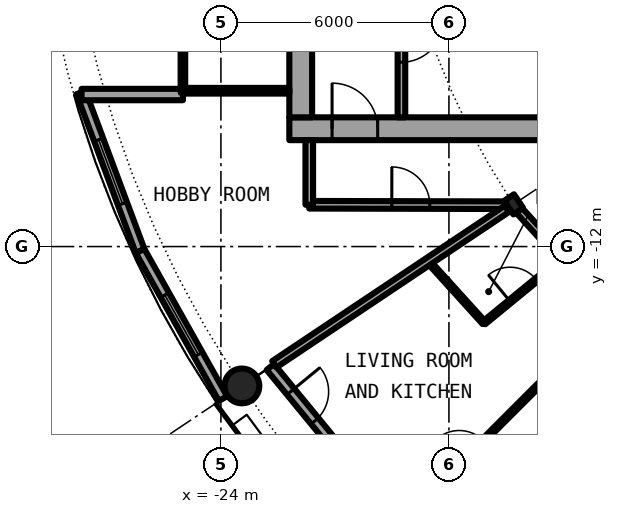
"""IFC4 building model, lengths in metres.
Left out: names, types, materials, properties, quantities, classifications, styles, units other than length and angle.
Written with IfcOpenShell. Run it as: python <this file> out.ifc"""

import sys

from ifc_helpers import new_model, si_unit, direction, frame, frame_2d, origin, origin_2d, place, context, subcontext, project, spatial, rectangle, hollow_circle, i_section, extrude, element, fill, save


model = new_model("IFC4")
c1 = context("Model", 3, precision=1e-05, world=origin(), true_north=direction((0.0, 1.0)))
c2 = subcontext(c1, "Body", "Model", "MODEL_VIEW")
j1 = project(units=[si_unit("LENGTHUNIT", "METRE"), si_unit("PLANEANGLEUNIT", "RADIAN")], contexts=[c1])
p1 = place(None, origin())
s1 = spatial("IfcSite", under=j1, at=p1, CompositionType="ELEMENT")
p2 = place(p1, origin())
s2 = spatial("IfcBuilding", under=s1, at=p2, CompositionType="ELEMENT")
p3 = place(p2, frame((0.0, 0.0, 120.8)))
s3 = spatial("IfcBuildingStorey", under=s2, at=p3, CompositionType="ELEMENT", Elevation=120.8)
p4 = place(p3, frame((-23.448, -15.667, 0.0), z_axis=(0.0, 0.0, 1.0), x_axis=(1.0, 0.0, 0.0)))
e1 = element("IfcColumn", 1, at=p4, inside=s3, PredefinedType="COLUMN", context=c2, shape_type="SweptSolid", body=[
    extrude(hollow_circle(Radius=0.457, WallThickness=0.04, at=origin_2d()), origin(), (0.0, 0.0, 1.0), 3.05),
])
p5 = place(p3, frame((-16.297, -10.889, 0.0), z_axis=(0.0, 0.0, 1.0), x_axis=(-0.831469612303, -0.55557023302, 0.0)))
e2 = element("IfcColumn", 2, at=p5, inside=s3, PredefinedType="COLUMN", context=c2, shape_type="SweptSolid", body=[
    extrude(i_section(OverallWidth=0.307, OverallDepth=0.432, WebThickness=0.021, FlangeThickness=0.04, FilletRadius=0.027, at=origin_2d()), origin(), (0.0, 0.0, 1.0), 3.05),
])
p6 = place(p3, frame((-22.699, -15.167, 0.0), z_axis=(0.0, 0.0, 1.0), x_axis=(0.634382322723, -0.773019449054, 0.0)))
e3 = element("IfcWall", 3, at=p6, inside=s3, PredefinedType="SOLIDWALL", context=c2, shape_type="SweptSolid", body=[
    extrude(rectangle(XDim=5.352, YDim=0.25, at=frame_2d((2.676, 0.0))), origin(), (0.0, 0.0, 1.0), 2.7),
])
p7 = place(p6, frame((0.841, 0.0, 0.0)))
e4 = element("IfcOpeningElement", 4, at=p7, cuts=e3, PredefinedType="OPENING", context=c2, shape_type="SweptSolid", body=[
    extrude(rectangle(XDim=1.0, YDim=2.2, at=frame_2d((0.5, 1.1))), frame((0.0, 0.135, 0.0), z_axis=(0.0, -1.0, 0.0), x_axis=(1.0, 0.0, 0.0)), (0.0, 0.0, 1.0), 0.27),
])
p8 = place(p6, frame((3.111, 0.0, 0.3)))
e5 = element("IfcOpeningElement", 5, at=p8, cuts=e3, PredefinedType="OPENING", context=c2, shape_type="SweptSolid", body=[
    extrude(rectangle(XDim=1.8, YDim=2.1, at=frame_2d((0.9, 1.05))), frame((0.0, 0.135, 0.0), z_axis=(0.0, -1.0, 0.0), x_axis=(1.0, 0.0, 0.0)), (0.0, 0.0, 1.0), 0.27),
])
p9 = place(p3, frame((-27.682, -7.945, 0.0), z_axis=(0.0, 0.0, 1.0), x_axis=(0.349247811493, -0.937030397675, 0.0)))
e6 = element("IfcWall", 6, at=p9, inside=s3, PredefinedType="SOLIDWALL", context=c2, shape_type="SweptSolid", body=[
    extrude(rectangle(XDim=4.452, YDim=0.25, at=frame_2d((2.226, 0.0))), origin(), (0.0, 0.0, 1.0), 2.7),
])
p10 = place(p9, frame((1.327, 0.0, 0.3)))
e7 = element("IfcOpeningElement", 7, at=p10, cuts=e6, PredefinedType="OPENING", context=c2, shape_type="SweptSolid", body=[
    extrude(rectangle(XDim=1.8, YDim=2.1, at=frame_2d((0.9, 1.05))), frame((0.0, 0.135, 0.0), z_axis=(0.0, -1.0, 0.0), x_axis=(1.0, 0.0, 0.0)), (0.0, 0.0, 1.0), 0.27),
])
p11 = place(p3, frame((-26.127, -12.117, 0.0), z_axis=(0.0, 0.0, 1.0), x_axis=(0.489696356642, -0.871893042919, 0.0)))
e8 = element("IfcWall", 8, at=p11, inside=s3, PredefinedType="SOLIDWALL", context=c2, shape_type="SweptSolid", body=[
    extrude(rectangle(XDim=4.454, YDim=0.25, at=frame_2d((2.227, 0.0))), origin(), (0.0, 0.0, 1.0), 2.7),
])
p12 = place(p11, frame((1.327, 0.0, 0.3)))
e9 = element("IfcOpeningElement", 9, at=p12, cuts=e8, PredefinedType="OPENING", context=c2, shape_type="SweptSolid", body=[
    extrude(rectangle(XDim=1.8, YDim=2.1, at=frame_2d((0.9, 1.05))), frame((0.0, 0.135, 0.0), z_axis=(0.0, -1.0, 0.0), x_axis=(1.0, 0.0, 0.0)), (0.0, 0.0, 1.0), 0.27),
])
p13 = place(p3, frame((-25.0, -8.0, 0.0), z_axis=(0.0, 0.0, 1.0), x_axis=(-1.0, 0.0, 0.0)))
e10 = element("IfcWall", 10, at=p13, inside=s3, PredefinedType="SOLIDWALL", context=c2, shape_type="SweptSolid", body=[
    extrude(rectangle(XDim=2.667, YDim=0.3, at=frame_2d((1.333, 0.0))), origin(), (0.0, 0.0, 1.0), 2.7),
])
p14 = place(p3, frame((-22.2, -8.9, 0.0), z_axis=(0.0, 0.0, 1.0), x_axis=(1.0, 0.0, 0.0)))
e11 = element("IfcWall", 11, at=p14, inside=s3, PredefinedType="SHEAR", context=c2, shape_type="SweptSolid", body=[
    extrude(rectangle(XDim=13.8, YDim=0.6, at=frame_2d((6.9, 0.0))), origin(), (0.0, 0.0, 1.0), 3.05),
])
p15 = place(p14, frame((1.125, 0.0, 0.0)))
e12 = element("IfcOpeningElement", 12, at=p15, cuts=e11, PredefinedType="OPENING", context=c2, shape_type="SweptSolid", body=[
    extrude(rectangle(XDim=1.2, YDim=2.3, at=frame_2d((0.6, 1.15))), frame((0.0, 0.31, 0.0), z_axis=(0.0, -1.0, 0.0), x_axis=(1.0, 0.0, 0.0)), (0.0, 0.0, 1.0), 0.62),
])
p16 = place(p3, frame((-21.9, -8.6, 0.0), z_axis=(0.0, 0.0, 1.0), x_axis=(0.0, 1.0, 0.0)))
e13 = element("IfcWall", 13, at=p16, inside=s3, PredefinedType="SHEAR", context=c2, shape_type="SweptSolid", body=[
    extrude(rectangle(XDim=17.2, YDim=0.6, at=frame_2d((8.6, 0.0))), origin(), (0.0, 0.0, 1.0), 3.05),
])
p17 = place(p16, frame((7.7, 0.0, 0.0)))
e14 = element("IfcOpeningElement", 14, at=p17, cuts=e13, PredefinedType="OPENING", context=c2, shape_type="SweptSolid", body=[
    extrude(rectangle(XDim=1.8, YDim=2.3, at=frame_2d((0.9, 1.15))), frame((0.0, 0.31, 0.0), z_axis=(0.0, -1.0, 0.0), x_axis=(1.0, 0.0, 0.0)), (0.0, 0.0, 1.0), 0.62),
])
p18 = place(p3, frame((-19.25, -1.575, 0.0), z_axis=(0.0, 0.0, 1.0), x_axis=(0.0, -1.0, 0.0)))
e15 = element("IfcWall", 15, at=p18, inside=s3, PredefinedType="SOLIDWALL", context=c2, shape_type="SweptSolid", body=[
    extrude(rectangle(XDim=7.025, YDim=0.2, at=frame_2d((3.513, 0.0))), origin(), (0.0, 0.0, 1.0), 2.7),
])
p19 = place(p18, frame((4.475, 0.0, 0.0)))
e16 = element("IfcOpeningElement", 16, at=p19, cuts=e15, PredefinedType="OPENING", context=c2, shape_type="SweptSolid", body=[
    extrude(rectangle(XDim=1.1, YDim=2.3, at=frame_2d((0.55, 1.15))), frame((0.0, 0.11, 0.0), z_axis=(0.0, -1.0, 0.0), x_axis=(1.0, 0.0, 0.0)), (0.0, 0.0, 1.0), 0.22),
])
p20 = place(p3, frame((-22.2, -7.9, 0.0), z_axis=(0.0, 0.0, 1.0), x_axis=(-1.0, 0.0, 0.0)))
e17 = element("IfcWall", 17, at=p20, inside=s3, PredefinedType="PARTITIONING", context=c2, shape_type="SweptSolid", body=[
    extrude(rectangle(XDim=2.74, YDim=0.15, at=frame_2d((1.37, 0.0))), origin(), (0.0, 0.0, 1.0), 2.7),
])
p21 = place(p3, frame((-25.0, 7.95, 0.0), z_axis=(0.0, 0.0, 1.0), x_axis=(0.0, -1.0, 0.0)))
e18 = element("IfcWall", 18, at=p21, inside=s3, PredefinedType="PARTITIONING", context=c2, shape_type="SweptSolid", body=[
    extrude(rectangle(XDim=15.9, YDim=0.12, at=frame_2d((7.95, 0.0))), origin(), (0.0, 0.0, 1.0), 2.7),
])
p22 = place(p21, frame((0.95, 0.0, 0.1)))
e19 = element("IfcOpeningElement", 19, at=p22, cuts=e18, PredefinedType="OPENING", context=c2, shape_type="SweptSolid", body=[
    extrude(rectangle(XDim=14.0, YDim=2.35, at=frame_2d((7.0, 1.175))), frame((0.0, 0.07, 0.0), z_axis=(0.0, -1.0, 0.0), x_axis=(1.0, 0.0, 0.0)), (0.0, 0.0, 1.0), 0.14),
])
p23 = place(p3, frame((-18.542, -12.389, 0.0), z_axis=(0.0, 0.0, 1.0), x_axis=(0.671396556615, -0.741098282123, 0.0)))
e20 = element("IfcWall", 20, at=p23, inside=s3, PredefinedType="PARTITIONING", context=c2, shape_type="SweptSolid", body=[
    extrude(rectangle(XDim=2.182, YDim=0.1, at=frame_2d((1.091, 0.0))), origin(), (0.0, 0.0, 1.0), 2.7),
])
p24 = place(p3, frame((-16.192, -11.004, 0.0), z_axis=(0.0, 0.0, 1.0), x_axis=(0.671481997275, -0.741020868354, 0.0)))
e21 = element("IfcWall", 21, at=p24, inside=s3, PredefinedType="PARTITIONING", context=c2, shape_type="SweptSolid", body=[
    extrude(rectangle(XDim=5.596, YDim=0.2, at=frame_2d((2.798, 0.0))), origin(), (0.0, 0.0, 1.0), 2.39),
])
p25 = place(p24, frame((3.179, 0.0, 0.0)))
e22 = element("IfcOpeningElement", 22, at=p25, cuts=e21, PredefinedType="OPENING", context=c2, shape_type="SweptSolid", body=[
    extrude(rectangle(XDim=1.0, YDim=2.3, at=frame_2d((0.5, 1.15))), frame((0.0, 0.11, 0.0), z_axis=(0.0, -1.0, 0.0), x_axis=(1.0, 0.0, 0.0)), (0.0, 0.0, 1.0), 0.22),
])
p26 = place(p3, frame((-21.675, -10.9, 0.0), z_axis=(0.0, 0.0, 1.0), x_axis=(0.999997173357, -0.002377662213, 0.0)))
e23 = element("IfcWall", 23, at=p26, inside=s3, PredefinedType="PARTITIONING", context=c2, shape_type="SweptSolid", body=[
    extrude(rectangle(XDim=5.134, YDim=0.2, at=frame_2d((2.567, 0.0))), origin(), (0.0, 0.0, 1.0), 2.7),
])
p27 = place(p26, frame((2.171, 0.0, 0.0)))
e24 = element("IfcOpeningElement", 24, at=p27, cuts=e23, PredefinedType="OPENING", context=c2, shape_type="SweptSolid", body=[
    extrude(rectangle(XDim=1.0, YDim=2.3, at=frame_2d((0.5, 1.15))), frame((0.0, 0.11, 0.0), z_axis=(0.0, -1.0, 0.0), x_axis=(1.0, 0.0, 0.0)), (0.0, 0.0, 1.0), 0.22),
])
p28 = place(p3, frame((-22.595, -15.097, 0.0), z_axis=(0.0, 0.0, 1.0), x_axis=(0.831467903109, 0.555572791, 0.0)))
e25 = element("IfcWall", 25, at=p28, inside=s3, PredefinedType="PARTITIONING", context=c2, shape_type="SweptSolid", body=[
    extrude(rectangle(XDim=7.358, YDim=0.2, at=frame_2d((3.679, 0.0))), origin(), (0.0, 0.0, 1.0), 2.7),
])
p29 = place(p3, frame((-19.21, -19.222, 0.0), z_axis=(0.0, 0.0, 1.0), x_axis=(0.706914880313, 0.707298629994, 0.0)))
e26 = element("IfcWall", 26, at=p29, inside=s3, PredefinedType="PARTITIONING", context=c2, shape_type="SweptSolid", body=[
    extrude(rectangle(XDim=5.09, YDim=0.1, at=frame_2d((2.545, 0.0))), origin(), (0.0, 0.0, 1.0), 2.7),
])
p30 = place(p29, frame((2.095, 0.0, 0.0)))
e27 = element("IfcOpeningElement", 27, at=p30, cuts=e26, PredefinedType="OPENING", context=c2, shape_type="SweptSolid", body=[
    extrude(rectangle(XDim=0.9, YDim=2.3, at=frame_2d((0.45, 1.15))), frame((0.0, 0.06, 0.0), z_axis=(0.0, -1.0, 0.0), x_axis=(1.0, 0.0, 0.0)), (0.0, 0.0, 1.0), 0.12),
])
p31 = place(p3, frame((-17.24, -21.007, 0.0), z_axis=(0.0, 0.0, 1.0), x_axis=(0.634381303318, 0.773020285633, 0.0)))
e28 = element("IfcWall", 28, at=p31, inside=s3, PredefinedType="PARTITIONING", context=c2, shape_type="SweptSolid", body=[
    extrude(rectangle(XDim=7.576, YDim=0.2, at=frame_2d((3.788, 0.0))), origin(), (0.0, 0.0, 1.0), 2.7),
])
p32 = place(p3, frame((-17.077, -14.006, 0.0), z_axis=(0.0, 0.0, 1.0), x_axis=(0.77319617123, 0.634166918717, 0.0)))
e29 = element("IfcWall", 29, at=p32, inside=s3, PredefinedType="PARTITIONING", context=c2, shape_type="SweptSolid", body=[
    extrude(rectangle(XDim=2.675, YDim=0.1, at=frame_2d((1.337, 0.0))), origin(), (0.0, 0.0, 1.0), 2.7),
])
p33 = place(p32, frame((0.887, 0.0, 0.0)))
e30 = element("IfcOpeningElement", 30, at=p33, cuts=e29, PredefinedType="OPENING", context=c2, shape_type="SweptSolid", body=[
    extrude(rectangle(XDim=0.9, YDim=2.3, at=frame_2d((0.45, 1.15))), frame((0.0, 0.06, 0.0), z_axis=(0.0, -1.0, 0.0), x_axis=(1.0, 0.0, 0.0)), (0.0, 0.0, 1.0), 0.12),
])
p34 = place(p3, frame((-21.675, -10.9, 0.0), z_axis=(0.0, 0.0, 1.0), x_axis=(0.0, 1.0, 0.0)))
e31 = element("IfcWall", 31, at=p34, inside=s3, PredefinedType="PARTITIONING", context=c2, shape_type="SweptSolid", body=[
    extrude(rectangle(XDim=1.7, YDim=0.2, at=frame_2d((0.85, 0.0))), origin(), (0.0, 0.0, 1.0), 2.7),
])
p35 = place(p7, origin())
e32 = element("IfcDoor", 32, at=p35, inside=s3, OperationType="SINGLE_SWING_LEFT", PredefinedType="DOOR", context=c2, shape_type="SweptSolid", body=[
    extrude(rectangle(XDim=1.0, YDim=2.2, at=frame_2d((0.5, 1.1))), frame((0.0, 0.025, 0.0), z_axis=(0.0, -1.0, 0.0), x_axis=(1.0, 0.0, 0.0)), (0.0, 0.0, 1.0), 0.05),
])
fill(e4, e32)
p36 = place(p10, origin())
e33 = element("IfcWindow", 33, at=p36, inside=s3, PartitioningType="SINGLE_PANEL", PredefinedType="WINDOW", context=c2, shape_type="SweptSolid", body=[
    extrude(rectangle(XDim=1.8, YDim=2.1, at=frame_2d((0.9, 1.05))), frame((0.0, 0.03, 0.0), z_axis=(0.0, -1.0, 0.0), x_axis=(1.0, 0.0, 0.0)), (0.0, 0.0, 1.0), 0.06),
])
fill(e7, e33)
p37 = place(p12, origin())
e34 = element("IfcWindow", 34, at=p37, inside=s3, PartitioningType="SINGLE_PANEL", PredefinedType="WINDOW", context=c2, shape_type="SweptSolid", body=[
    extrude(rectangle(XDim=1.8, YDim=2.1, at=frame_2d((0.9, 1.05))), frame((0.0, 0.03, 0.0), z_axis=(0.0, -1.0, 0.0), x_axis=(1.0, 0.0, 0.0)), (0.0, 0.0, 1.0), 0.06),
])
fill(e9, e34)
p38 = place(p19, origin())
e35 = element("IfcDoor", 35, at=p38, inside=s3, OperationType="SINGLE_SWING_LEFT", PredefinedType="DOOR", context=c2, shape_type="SweptSolid", body=[
    extrude(rectangle(XDim=1.1, YDim=2.3, at=frame_2d((0.55, 1.15))), frame((0.0, 0.025, 0.0), z_axis=(0.0, -1.0, 0.0), x_axis=(1.0, 0.0, 0.0)), (0.0, 0.0, 1.0), 0.05),
])
fill(e16, e35)
p39 = place(p15, origin())
e36 = element("IfcDoor", 36, at=p39, inside=s3, OperationType="SINGLE_SWING_RIGHT", PredefinedType="DOOR", context=c2, shape_type="SweptSolid", body=[
    extrude(rectangle(XDim=1.2, YDim=2.3, at=frame_2d((0.6, 1.15))), frame((0.0, 0.025, 0.0), z_axis=(0.0, -1.0, 0.0), x_axis=(1.0, 0.0, 0.0)), (0.0, 0.0, 1.0), 0.05),
])
fill(e12, e36)
p40 = place(p22, origin())
e37 = element("IfcWindow", 37, at=p40, inside=s3, PartitioningType="SINGLE_PANEL", PredefinedType="WINDOW", context=c2, shape_type="SweptSolid", body=[
    extrude(rectangle(XDim=14.0, YDim=2.35, at=frame_2d((7.0, 1.175))), frame((0.0, 0.03, 0.0), z_axis=(0.0, -1.0, 0.0), x_axis=(1.0, 0.0, 0.0)), (0.0, 0.0, 1.0), 0.06),
])
fill(e19, e37)
p41 = place(p33, origin())
e38 = element("IfcDoor", 38, at=p41, inside=s3, OperationType="SINGLE_SWING_LEFT", PredefinedType="DOOR", context=c2, shape_type="SweptSolid", body=[
    extrude(rectangle(XDim=0.9, YDim=2.3, at=frame_2d((0.45, 1.15))), frame((0.0, 0.025, 0.0), z_axis=(0.0, -1.0, 0.0), x_axis=(1.0, 0.0, 0.0)), (0.0, 0.0, 1.0), 0.05),
])
fill(e30, e38)
p42 = place(p27, origin())
e39 = element("IfcDoor", 39, at=p42, inside=s3, OperationType="SINGLE_SWING_RIGHT", PredefinedType="DOOR", context=c2, shape_type="SweptSolid", body=[
    extrude(rectangle(XDim=1.0, YDim=2.3, at=frame_2d((0.5, 1.15))), frame((0.0, 0.025, 0.0), z_axis=(0.0, -1.0, 0.0), x_axis=(1.0, 0.0, 0.0)), (0.0, 0.0, 1.0), 0.05),
])
fill(e24, e39)
save(model, sys.argv[1])
